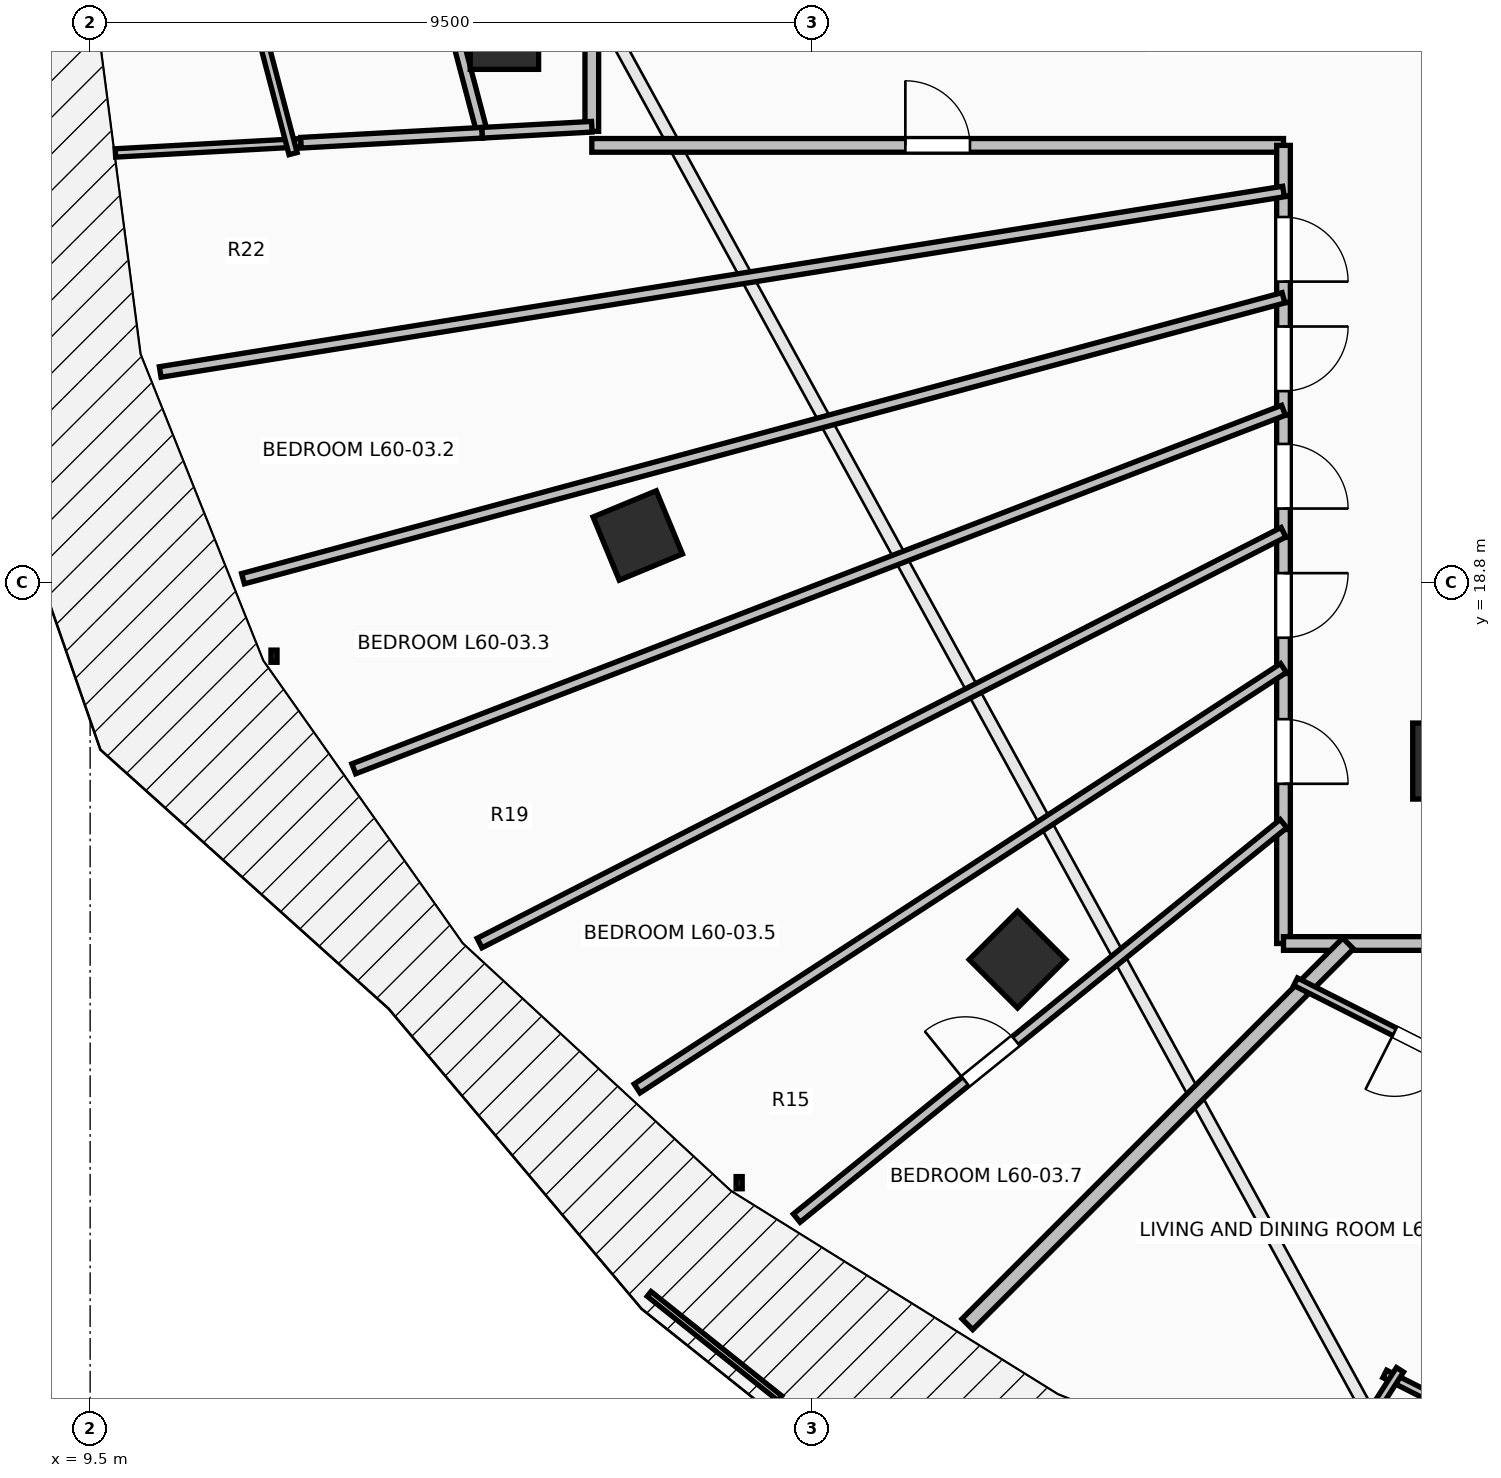
"""IFC4 building model, lengths in metres.
Left out: names, types, materials, properties, quantities, classifications, styles, units other than length and angle.
Written with IfcOpenShell. Run it as: python <this file> out.ifc"""

import sys

from ifc_helpers import new_model, si_unit, direction, frame, frame_2d, origin, origin_2d, place, context, subcontext, project, spatial, rectangle, extrude, element, fill, save


model = new_model("IFC4")
c1 = context("Model", 3, precision=1e-05, world=origin(), true_north=direction((0.0, 1.0)))
c2 = subcontext(c1, "Body", "Model", "MODEL_VIEW")
j1 = project(units=[si_unit("LENGTHUNIT", "METRE"), si_unit("PLANEANGLEUNIT", "RADIAN")], contexts=[c1])
p1 = place(None, origin())
s1 = spatial("IfcSite", under=j1, at=p1, CompositionType="ELEMENT")
p2 = place(p1, origin())
s2 = spatial("IfcBuilding", under=s1, at=p2, CompositionType="ELEMENT")
p3 = place(p2, frame((0.0, 0.0, 221.4)))
s3 = spatial("IfcBuildingStorey", under=s2, at=p3, CompositionType="ELEMENT", Elevation=221.4)
for number, where, z_axis, x_axis in (
    (1, (14.95, 26.0, 0.0), (0.0, 0.0, 1.0), (-1.0, 0.0, 0.0)),
    (2, (16.705, 19.418, 0.0), (0.0, 0.0, 1.0), (-0.924, -0.383, 0.0)),
    (3, (21.701, 13.838, 0.0), (0.0, 0.0, 1.0), (-0.707, -0.707, 0.0)),
):
    element("IfcColumn", number, at=place(p3, frame(where, z_axis=z_axis, x_axis=x_axis)), inside=s3, PredefinedType="COLUMN", context=c2, shape_type="SweptSolid", body=[
        extrude(rectangle(XDim=0.9, YDim=0.9, at=origin_2d()), origin(), (0.0, 0.0, 1.0), 3.55),
    ])
p4 = place(p3, frame((27.25, 16.45, 0.0), z_axis=(0.0, 0.0, 1.0), x_axis=(1.0, 0.0, 0.0)))
e4 = element("IfcColumn", 4, at=p4, inside=s3, PredefinedType="PILASTER", context=c2, shape_type="SweptSolid", body=[
    extrude(rectangle(XDim=0.7, YDim=1.0, at=origin_2d()), origin(), (0.0, 0.0, 1.0), 3.55),
])
p5 = place(p3, frame((16.1, 27.25, 0.0), z_axis=(0.0, 0.0, 1.0), x_axis=(0.0, -1.0, 0.0)))
e5 = element("IfcWall", 5, at=p5, inside=s3, PredefinedType="PARTITIONING", context=c2, shape_type="SweptSolid", body=[
    extrude(rectangle(XDim=2.515, YDim=0.18, at=frame_2d((1.257, 0.0))), origin(), (0.0, 0.0, 1.0), 2.392),
])
p6 = place(p3, frame((16.1, 24.55, 0.0), z_axis=(0.0, 0.0, 1.0), x_axis=(1.0, 0.0, 0.0)))
e6 = element("IfcWall", 6, at=p6, inside=s3, PredefinedType="PARTITIONING", context=c2, shape_type="SweptSolid", body=[
    extrude(rectangle(XDim=9.1, YDim=0.18, at=frame_2d((4.55, 0.0))), origin(), (0.0, 0.0, 1.0), 2.834),
])
p7 = place(p6, frame((4.125, 0.0, 0.0)))
e7 = element("IfcOpeningElement", 7, at=p7, cuts=e6, PredefinedType="OPENING", context=c2, shape_type="SweptSolid", body=[
    extrude(rectangle(XDim=0.85, YDim=2.1, at=frame_2d((0.425, 1.05))), frame((0.0, 0.105, 0.0), z_axis=(0.0, -1.0, 0.0), x_axis=(1.0, 0.0, 0.0)), (0.0, 0.0, 1.0), 0.21),
])
p8 = place(p3, frame((25.2, 24.55, 0.0), z_axis=(0.0, 0.0, 1.0), x_axis=(0.0, -1.0, 0.0)))
e8 = element("IfcWall", 8, at=p8, inside=s3, PredefinedType="PARTITIONING", context=c2, shape_type="SweptSolid", body=[
    extrude(rectangle(XDim=0.668, YDim=0.18, at=frame_2d((0.334, 0.0))), origin(), (0.0, 0.0, 1.0), 3.2),
])
p9 = place(p3, frame((25.2, 23.882, 0.0), z_axis=(0.0, 0.0, 1.0), x_axis=(0.0, -1.0, 0.0)))
e9 = element("IfcWall", 9, at=p9, inside=s3, PredefinedType="PARTITIONING", context=c2, shape_type="SweptSolid", body=[
    extrude(rectangle(XDim=1.399, YDim=0.18, at=frame_2d((0.7, 0.0))), origin(), (0.0, 0.0, 1.0), 3.2),
])
p10 = place(p9, frame((0.274, 0.0, 0.0)))
e10 = element("IfcOpeningElement", 10, at=p10, cuts=e9, PredefinedType="OPENING", context=c2, shape_type="SweptSolid", body=[
    extrude(rectangle(XDim=0.85, YDim=2.1, at=frame_2d((0.425, 1.05))), frame((0.0, 0.105, 0.0), z_axis=(0.0, -1.0, 0.0), x_axis=(1.0, 0.0, 0.0)), (0.0, 0.0, 1.0), 0.21),
])
p11 = place(p3, frame((25.2, 22.483, 0.0), z_axis=(0.0, 0.0, 1.0), x_axis=(0.0, -1.0, 0.0)))
e11 = element("IfcWall", 11, at=p11, inside=s3, PredefinedType="PARTITIONING", context=c2, shape_type="SweptSolid", body=[
    extrude(rectangle(XDim=1.482, YDim=0.18, at=frame_2d((0.741, 0.0))), origin(), (0.0, 0.0, 1.0), 3.2),
])
p12 = place(p11, frame((0.316, 0.0, 0.0)))
e12 = element("IfcOpeningElement", 12, at=p12, cuts=e11, PredefinedType="OPENING", context=c2, shape_type="SweptSolid", body=[
    extrude(rectangle(XDim=0.85, YDim=2.1, at=frame_2d((0.425, 1.05))), frame((0.0, 0.105, 0.0), z_axis=(0.0, -1.0, 0.0), x_axis=(1.0, 0.0, 0.0)), (0.0, 0.0, 1.0), 0.21),
])
p13 = place(p3, frame((25.2, 21.001, 0.0), z_axis=(0.0, 0.0, 1.0), x_axis=(0.0, -1.0, 0.0)))
e13 = element("IfcWall", 13, at=p13, inside=s3, PredefinedType="PARTITIONING", context=c2, shape_type="SweptSolid", body=[
    extrude(rectangle(XDim=1.608, YDim=0.18, at=frame_2d((0.804, 0.0))), origin(), (0.0, 0.0, 1.0), 3.2),
])
p14 = place(p13, frame((0.379, 0.0, 0.0)))
e14 = element("IfcOpeningElement", 14, at=p14, cuts=e13, PredefinedType="OPENING", context=c2, shape_type="SweptSolid", body=[
    extrude(rectangle(XDim=0.85, YDim=2.1, at=frame_2d((0.425, 1.05))), frame((0.0, 0.105, 0.0), z_axis=(0.0, -1.0, 0.0), x_axis=(1.0, 0.0, 0.0)), (0.0, 0.0, 1.0), 0.21),
])
p15 = place(p3, frame((25.2, 19.393, 0.0), z_axis=(0.0, 0.0, 1.0), x_axis=(0.0, -1.0, 0.0)))
e15 = element("IfcWall", 15, at=p15, inside=s3, PredefinedType="PARTITIONING", context=c2, shape_type="SweptSolid", body=[
    extrude(rectangle(XDim=1.791, YDim=0.18, at=frame_2d((0.896, 0.0))), origin(), (0.0, 0.0, 1.0), 3.2),
])
p16 = place(p15, frame((0.47, 0.0, 0.0)))
e16 = element("IfcOpeningElement", 16, at=p16, cuts=e15, PredefinedType="OPENING", context=c2, shape_type="SweptSolid", body=[
    extrude(rectangle(XDim=0.85, YDim=2.1, at=frame_2d((0.425, 1.05))), frame((0.0, 0.105, 0.0), z_axis=(0.0, -1.0, 0.0), x_axis=(1.0, 0.0, 0.0)), (0.0, 0.0, 1.0), 0.21),
])
p17 = place(p3, frame((25.2, 17.602, 0.0), z_axis=(0.0, 0.0, 1.0), x_axis=(0.0, -1.0, 0.0)))
e17 = element("IfcWall", 17, at=p17, inside=s3, PredefinedType="PARTITIONING", context=c2, shape_type="SweptSolid", body=[
    extrude(rectangle(XDim=2.052, YDim=0.18, at=frame_2d((1.026, 0.0))), origin(), (0.0, 0.0, 1.0), 2.392),
])
p18 = place(p17, frame((0.601, 0.0, 0.0)))
e18 = element("IfcOpeningElement", 18, at=p18, cuts=e17, PredefinedType="OPENING", context=c2, shape_type="SweptSolid", body=[
    extrude(rectangle(XDim=0.85, YDim=2.1, at=frame_2d((0.425, 1.05))), frame((0.0, 0.105, 0.0), z_axis=(0.0, -1.0, 0.0), x_axis=(1.0, 0.0, 0.0)), (0.0, 0.0, 1.0), 0.21),
])
p19 = place(p3, frame((25.2, 15.55, 0.0), z_axis=(0.0, 0.0, 1.0), x_axis=(0.0, -1.0, 0.0)))
e19 = element("IfcWall", 19, at=p19, inside=s3, PredefinedType="PARTITIONING", context=c2, shape_type="SweptSolid", body=[
    extrude(rectangle(XDim=1.5, YDim=0.18, at=frame_2d((0.75, 0.0))), origin(), (0.0, 0.0, 1.0), 2.392),
])
p20 = place(p3, frame((25.2, 14.05, 0.0), z_axis=(0.0, 0.0, 1.0), x_axis=(1.0, 0.0, 0.0)))
e20 = element("IfcWall", 20, at=p20, inside=s3, PredefinedType="PARTITIONING", context=c2, shape_type="SweptSolid", body=[
    extrude(rectangle(XDim=0.91, YDim=0.18, at=frame_2d((0.455, 0.0))), origin(), (0.0, 0.0, 1.0), 2.889),
])
p21 = place(p3, frame((25.97, 14.05, 0.0), z_axis=(0.0, 0.0, 1.0), x_axis=(1.0, 0.0, 0.0)))
e21 = element("IfcWall", 21, at=p21, inside=s3, PredefinedType="PARTITIONING", context=c2, shape_type="SweptSolid", body=[
    extrude(rectangle(XDim=4.124, YDim=0.18, at=frame_2d((2.062, 0.0))), origin(), (0.0, 0.0, 1.0), 2.392),
])
p22 = place(p3, frame((12.274, 24.585, 0.0), z_axis=(0.0, 0.0, 1.0), x_axis=(-0.998485442787, -0.055016547898, 0.0)))
e22 = element("IfcWall", 22, at=p22, inside=s3, PredefinedType="PARTITIONING", context=c2, shape_type="SweptSolid", body=[
    extrude(rectangle(XDim=2.445, YDim=0.11, at=frame_2d((1.223, 0.0))), origin(), (0.0, 0.0, 1.0), 3.2),
])
p23 = place(p3, frame((14.32, 26.0, 0.0), z_axis=(0.0, 0.0, 1.0), x_axis=(0.254502350799, -0.967072155239, 0.0)))
e23 = element("IfcWall", 23, at=p23, inside=s3, PredefinedType="PARTITIONING", context=c2, shape_type="SweptSolid", body=[
    extrude(rectangle(XDim=1.328, YDim=0.14, at=frame_2d((0.664, 0.0))), origin(), (0.0, 0.0, 1.0), 3.2),
])
p24 = place(p3, frame((14.658, 24.716, 0.0), z_axis=(0.0, 0.0, 1.0), x_axis=(-0.998486041439, -0.055005681988, 0.0)))
e24 = element("IfcWall", 24, at=p24, inside=s3, PredefinedType="PARTITIONING", context=c2, shape_type="SweptSolid", body=[
    extrude(rectangle(XDim=2.388, YDim=0.14, at=frame_2d((1.194, 0.0))), origin(), (0.0, 0.0, 1.0), 3.2),
])
p25 = place(p3, frame((14.658, 24.716, 0.0), z_axis=(0.0, 0.0, 1.0), x_axis=(0.99849911476, 0.054767853933, 0.0)))
e25 = element("IfcWall", 25, at=p25, inside=s3, PredefinedType="PARTITIONING", context=c2, shape_type="SweptSolid", body=[
    extrude(rectangle(XDim=1.444, YDim=0.14, at=frame_2d((0.722, 0.0))), origin(), (0.0, 0.0, 1.0), 2.734),
])
p26 = place(p3, frame((12.17, 24.442, 0.0), z_axis=(0.0, 0.0, 1.0), x_axis=(-0.254260000639, 0.967135901554, 0.0)))
e26 = element("IfcWall", 26, at=p26, inside=s3, PredefinedType="PARTITIONING", context=c2, shape_type="SweptSolid", body=[
    extrude(rectangle(XDim=1.751, YDim=0.11, at=frame_2d((0.876, 0.0))), origin(), (0.0, 0.0, 1.0), 3.2),
])
p27 = place(p3, frame((10.422, 21.569, 0.0), z_axis=(0.0, 0.0, 1.0), x_axis=(0.987340682458, 0.158613923612, 0.0)))
e27 = element("IfcWall", 27, at=p27, inside=s3, PredefinedType="PARTITIONING", context=c2, shape_type="SweptSolid", body=[
    extrude(rectangle(XDim=14.967, YDim=0.14, at=frame_2d((7.484, 0.0))), origin(), (0.0, 0.0, 1.0), 2.734),
])
p28 = place(p3, frame((11.511, 18.849, 0.0), z_axis=(0.0, 0.0, 1.0), x_axis=(0.965432982217, 0.260651408682, 0.0)))
e28 = element("IfcWall", 28, at=p28, inside=s3, PredefinedType="PARTITIONING", context=c2, shape_type="SweptSolid", body=[
    extrude(rectangle(XDim=14.179, YDim=0.14, at=frame_2d((7.09, 0.0))), origin(), (0.0, 0.0, 1.0), 2.734),
])
p29 = place(p3, frame((12.968, 16.348, 0.0), z_axis=(0.0, 0.0, 1.0), x_axis=(0.933027024267, 0.35980629787, 0.0)))
e29 = element("IfcWall", 29, at=p29, inside=s3, PredefinedType="PARTITIONING", context=c2, shape_type="SweptSolid", body=[
    extrude(rectangle(XDim=13.11, YDim=0.14, at=frame_2d((6.555, 0.0))), origin(), (0.0, 0.0, 1.0), 2.392),
])
p30 = place(p3, frame((14.623, 14.056, 0.0), z_axis=(0.0, 0.0, 1.0), x_axis=(0.890500200784, 0.454982848472, 0.0)))
e30 = element("IfcWall", 30, at=p30, inside=s3, PredefinedType="PARTITIONING", context=c2, shape_type="SweptSolid", body=[
    extrude(rectangle(XDim=11.877, YDim=0.14, at=frame_2d((5.939, 0.0))), origin(), (0.0, 0.0, 1.0), 2.392),
])
p31 = place(p3, frame((16.696, 12.143, 0.0), z_axis=(0.0, 0.0, 1.0), x_axis=(0.83828742398, 0.545228571149, 0.0)))
e31 = element("IfcWall", 31, at=p31, inside=s3, PredefinedType="PARTITIONING", context=c2, shape_type="SweptSolid", body=[
    extrude(rectangle(XDim=10.144, YDim=0.14, at=frame_2d((5.072, 0.0))), origin(), (0.0, 0.0, 1.0), 2.392),
])
p32 = place(p3, frame((18.796, 10.437, 0.0), z_axis=(0.0, 0.0, 1.0), x_axis=(0.776906100203, 0.629616479666, 0.0)))
e32 = element("IfcWall", 32, at=p32, inside=s3, PredefinedType="PARTITIONING", context=c2, shape_type="SweptSolid", body=[
    extrude(rectangle(XDim=8.243, YDim=0.14, at=frame_2d((4.122, 0.0))), origin(), (0.0, 0.0, 1.0), 2.392),
])
p33 = place(p32, frame((2.856, 0.0, 0.0)))
e33 = element("IfcOpeningElement", 33, at=p33, cuts=e32, PredefinedType="OPENING", context=c2, shape_type="SweptSolid", body=[
    extrude(rectangle(XDim=0.85, YDim=2.1, at=frame_2d((0.425, 1.05))), frame((0.0, 0.085, 0.0), z_axis=(0.0, -1.0, 0.0), x_axis=(1.0, 0.0, 0.0)), (0.0, 0.0, 1.0), 0.17),
])
p34 = place(p3, frame((21.041, 9.041, 0.0), z_axis=(0.0, 0.0, 1.0), x_axis=(0.707106781187, 0.707106781187, 0.0)))
e34 = element("IfcWall", 34, at=p34, inside=s3, PredefinedType="PARTITIONING", context=c2, shape_type="SweptSolid", body=[
    extrude(rectangle(XDim=7.084, YDim=0.2, at=frame_2d((3.542, 0.0))), origin(), (0.0, 0.0, 1.0), 2.734),
])
p35 = place(p3, frame((28.723, 11.847, 0.0), z_axis=(0.0, 0.0, 1.0), x_axis=(-0.892449406128, 0.451147489743, 0.0)))
e35 = element("IfcWall", 35, at=p35, inside=s3, PredefinedType="PARTITIONING", context=c2, shape_type="SweptSolid", body=[
    extrude(rectangle(XDim=3.769, YDim=0.11, at=frame_2d((1.885, 0.0))), origin(), (0.0, 0.0, 1.0), 2.392),
])
p36 = place(p35, frame((1.46, 0.0, 0.0)))
e36 = element("IfcOpeningElement", 36, at=p36, cuts=e35, PredefinedType="OPENING", context=c2, shape_type="SweptSolid", body=[
    extrude(rectangle(XDim=0.85, YDim=2.1, at=frame_2d((0.425, 1.05))), frame((0.0, 0.07, 0.0), z_axis=(0.0, -1.0, 0.0), x_axis=(1.0, 0.0, 0.0)), (0.0, 0.0, 1.0), 0.14),
])
p37 = place(p3, frame((26.532, 8.387, 0.0), z_axis=(0.0, 0.0, 1.0), x_axis=(0.892649776719, -0.450750902521, 0.0)))
e37 = element("IfcWall", 37, at=p37, inside=s3, PredefinedType="PARTITIONING", context=c2, shape_type="SweptSolid", body=[
    extrude(rectangle(XDim=1.738, YDim=0.11, at=frame_2d((0.869, 0.0))), origin(), (0.0, 0.0, 1.0), 3.2),
])
p38 = place(p3, frame((25.649, 6.753, 0.0), z_axis=(0.0, 0.0, 1.0), x_axis=(0.539927041948, 0.841711820859, 0.0)))
e38 = element("IfcWall", 38, at=p38, inside=s3, PredefinedType="PARTITIONING", context=c2, shape_type="SweptSolid", body=[
    extrude(rectangle(XDim=2.006, YDim=0.11, at=frame_2d((1.003, 0.0))), origin(), (0.0, 0.0, 1.0), 3.2),
])
p39 = place(p36, origin())
e39 = element("IfcDoor", 39, at=p39, inside=s3, OperationType="SINGLE_SWING_RIGHT", PredefinedType="DOOR", context=c2, shape_type="SweptSolid", body=[
    extrude(rectangle(XDim=0.85, YDim=2.1, at=frame_2d((0.425, 1.05))), frame((0.0, 0.025, 0.0), z_axis=(0.0, -1.0, 0.0), x_axis=(1.0, 0.0, 0.0)), (0.0, 0.0, 1.0), 0.05),
])
fill(e36, e39)
p40 = place(p7, origin())
e40 = element("IfcDoor", 40, at=p40, inside=s3, OperationType="SINGLE_SWING_LEFT", PredefinedType="DOOR", context=c2, shape_type="SweptSolid", body=[
    extrude(rectangle(XDim=0.85, YDim=2.1, at=frame_2d((0.425, 1.05))), frame((0.0, 0.025, 0.0), z_axis=(0.0, -1.0, 0.0), x_axis=(1.0, 0.0, 0.0)), (0.0, 0.0, 1.0), 0.05),
])
fill(e7, e40)
p41 = place(p10, origin())
e41 = element("IfcDoor", 41, at=p41, inside=s3, OperationType="SINGLE_SWING_RIGHT", PredefinedType="DOOR", context=c2, shape_type="SweptSolid", body=[
    extrude(rectangle(XDim=0.85, YDim=2.1, at=frame_2d((0.425, 1.05))), frame((0.0, 0.025, 0.0), z_axis=(0.0, -1.0, 0.0), x_axis=(1.0, 0.0, 0.0)), (0.0, 0.0, 1.0), 0.05),
])
fill(e10, e41)
p42 = place(p12, origin())
e42 = element("IfcDoor", 42, at=p42, inside=s3, OperationType="SINGLE_SWING_LEFT", PredefinedType="DOOR", context=c2, shape_type="SweptSolid", body=[
    extrude(rectangle(XDim=0.85, YDim=2.1, at=frame_2d((0.425, 1.05))), frame((0.0, 0.025, 0.0), z_axis=(0.0, -1.0, 0.0), x_axis=(1.0, 0.0, 0.0)), (0.0, 0.0, 1.0), 0.05),
])
fill(e12, e42)
p43 = place(p14, origin())
e43 = element("IfcDoor", 43, at=p43, inside=s3, OperationType="SINGLE_SWING_RIGHT", PredefinedType="DOOR", context=c2, shape_type="SweptSolid", body=[
    extrude(rectangle(XDim=0.85, YDim=2.1, at=frame_2d((0.425, 1.05))), frame((0.0, 0.025, 0.0), z_axis=(0.0, -1.0, 0.0), x_axis=(1.0, 0.0, 0.0)), (0.0, 0.0, 1.0), 0.05),
])
fill(e14, e43)
p44 = place(p16, origin())
e44 = element("IfcDoor", 44, at=p44, inside=s3, OperationType="SINGLE_SWING_LEFT", PredefinedType="DOOR", context=c2, shape_type="SweptSolid", body=[
    extrude(rectangle(XDim=0.85, YDim=2.1, at=frame_2d((0.425, 1.05))), frame((0.0, 0.025, 0.0), z_axis=(0.0, -1.0, 0.0), x_axis=(1.0, 0.0, 0.0)), (0.0, 0.0, 1.0), 0.05),
])
fill(e16, e44)
p45 = place(p18, origin())
e45 = element("IfcDoor", 45, at=p45, inside=s3, OperationType="SINGLE_SWING_RIGHT", PredefinedType="DOOR", context=c2, shape_type="SweptSolid", body=[
    extrude(rectangle(XDim=0.85, YDim=2.1, at=frame_2d((0.425, 1.05))), frame((0.0, 0.025, 0.0), z_axis=(0.0, -1.0, 0.0), x_axis=(1.0, 0.0, 0.0)), (0.0, 0.0, 1.0), 0.05),
])
fill(e18, e45)
p46 = place(p33, origin())
e46 = element("IfcDoor", 46, at=p46, inside=s3, OperationType="SINGLE_SWING_LEFT", PredefinedType="DOOR", context=c2, shape_type="SweptSolid", body=[
    extrude(rectangle(XDim=0.85, YDim=2.1, at=frame_2d((0.425, 1.05))), frame((0.0, 0.025, 0.0), z_axis=(0.0, -1.0, 0.0), x_axis=(1.0, 0.0, 0.0)), (0.0, 0.0, 1.0), 0.05),
])
fill(e33, e46)
save(model, sys.argv[1])
